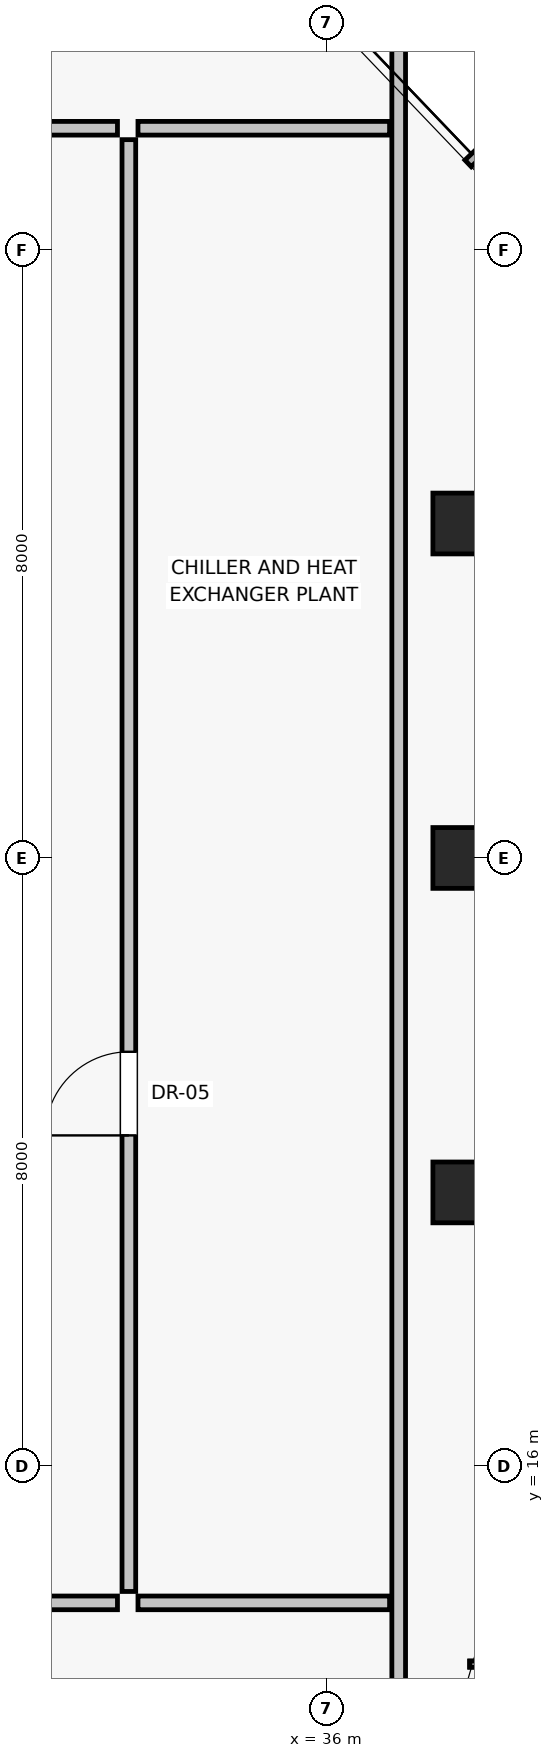
"""IFC4 building model, lengths in metres.
Left out: names, types, materials, properties, quantities, classifications, styles, units other than length and angle.
Written with IfcOpenShell. Run it as: python <this file> out.ifc"""

import sys

from ifc_helpers import new_model, si_unit, direction, frame, frame_2d, origin, origin_2d, place, context, subcontext, project, spatial, rectangle, extrude, source, transform, mapped, element, fill, save


model = new_model("IFC4")
c1 = context("Model", 3, precision=1e-05, world=origin(), true_north=direction((0.0, 1.0)))
c2 = subcontext(c1, "Body", "Model", "MODEL_VIEW")
j1 = project(units=[si_unit("LENGTHUNIT", "METRE"), si_unit("PLANEANGLEUNIT", "RADIAN")], contexts=[c1])
p1 = place(None, origin())
s1 = spatial("IfcSite", under=j1, at=p1, CompositionType="ELEMENT")
p2 = place(p1, origin())
s2 = spatial("IfcBuilding", under=s1, at=p2, CompositionType="ELEMENT")
p3 = place(p2, frame((0.0, 0.0, 264.25)))
s3 = spatial("IfcBuildingStorey", under=s2, at=p3, CompositionType="ELEMENT", Elevation=264.25)
for number, where, z_axis, x_axis in (
    (1, (37.8, 19.6, 0.0), (0.0, 0.0, 1.0), (1.0, 0.0, 0.0)),
    (2, (37.8, 24.0, 0.0), (0.0, 0.0, 1.0), (1.0, 0.0, 0.0)),
    (3, (37.8, 28.4, 0.0), (0.0, 0.0, 1.0), (1.0, 0.0, 0.0)),
):
    element("IfcColumn", number, at=place(p3, frame(where, z_axis=z_axis, x_axis=x_axis)), inside=s3, PredefinedType="COLUMN", context=c2, shape_type="SweptSolid", body=[
        extrude(rectangle(XDim=0.8, YDim=0.8, at=origin_2d()), origin(), (0.0, 0.0, 1.0), 4.65),
    ])
p4 = place(p3, frame((14.75, 14.2, 0.0), z_axis=(0.0, 0.0, 1.0), x_axis=(1.0, 0.0, 0.0)))
e4 = element("IfcWall", 4, at=p4, inside=s3, PredefinedType="PARTITIONING", context=c2, shape_type="SweptSolid", body=[
    extrude(rectangle(XDim=18.5, YDim=0.18, at=frame_2d((9.25, 0.0))), origin(), (0.0, 0.0, 1.0), 4.39),
])
p5 = place(p4, frame((6.0, 0.0, 0.0)))
e5 = element("IfcOpeningElement", 5, at=p5, cuts=e4, PredefinedType="OPENING", context=c2, shape_type="SweptSolid", body=[
    extrude(rectangle(XDim=1.1, YDim=2.03, at=frame_2d((0.55, 1.015))), frame((0.0, 0.1, 0.0), z_axis=(0.0, -1.0, 0.0), x_axis=(1.0, 0.0, 0.0)), (0.0, 0.0, 1.0), 0.2),
])
p6 = place(p3, frame((33.4, 14.35, 0.0), z_axis=(0.0, 0.0, 1.0), x_axis=(0.0, 1.0, 0.0)))
e6 = element("IfcWall", 6, at=p6, inside=s3, PredefinedType="PARTITIONING", context=c2, shape_type="SweptSolid", body=[
    extrude(rectangle(XDim=19.1, YDim=0.18, at=frame_2d((9.55, 0.0))), origin(), (0.0, 0.0, 1.0), 4.39),
])
p7 = place(p6, frame((6.0, 0.0, 0.0)))
e7 = element("IfcOpeningElement", 7, at=p7, cuts=e6, PredefinedType="OPENING", context=c2, shape_type="SweptSolid", body=[
    extrude(rectangle(XDim=1.1, YDim=2.03, at=frame_2d((0.55, 1.015))), frame((0.0, 0.1, 0.0), z_axis=(0.0, -1.0, 0.0), x_axis=(1.0, 0.0, 0.0)), (0.0, 0.0, 1.0), 0.2),
])
p8 = place(p3, frame((14.75, 33.6, 0.0), z_axis=(0.0, 0.0, 1.0), x_axis=(1.0, 0.0, 0.0)))
e8 = element("IfcWall", 8, at=p8, inside=s3, PredefinedType="PARTITIONING", context=c2, shape_type="SweptSolid", body=[
    extrude(rectangle(XDim=18.5, YDim=0.18, at=frame_2d((9.25, 0.0))), origin(), (0.0, 0.0, 1.0), 4.39),
])
p9 = place(p8, frame((6.0, 0.0, 0.0)))
e9 = element("IfcOpeningElement", 9, at=p9, cuts=e8, PredefinedType="OPENING", context=c2, shape_type="SweptSolid", body=[
    extrude(rectangle(XDim=1.1, YDim=2.03, at=frame_2d((0.55, 1.015))), frame((0.0, 0.1, 0.0), z_axis=(0.0, -1.0, 0.0), x_axis=(1.0, 0.0, 0.0)), (0.0, 0.0, 1.0), 0.2),
])
p10 = place(p3, frame((36.95, 11.17, 0.0), z_axis=(0.0, 0.0, 1.0), x_axis=(0.0, 1.0, 0.0)))
e10 = element("IfcWall", 10, at=p10, inside=s3, PredefinedType="PARTITIONING", context=c2, shape_type="SweptSolid", body=[
    extrude(rectangle(XDim=25.66, YDim=0.18, at=frame_2d((12.83, 0.0))), origin(), (0.0, 0.0, 1.0), 2.19),
])
for number, where, z_axis, x_axis in (
    (11, (33.52, 14.2, 0.0), (0.0, 0.0, 1.0), (1.0, 0.0, 0.0)),
    (12, (33.52, 33.6, 0.0), (0.0, 0.0, 1.0), (1.0, 0.0, 0.0)),
):
    element("IfcWall", number, at=place(p3, frame(where, z_axis=z_axis, x_axis=x_axis)), inside=s3, PredefinedType="PARTITIONING", context=c2, shape_type="SweptSolid", body=[
        extrude(rectangle(XDim=3.31, YDim=0.18, at=frame_2d((1.655, 0.0))), origin(), (0.0, 0.0, 1.0), 4.39),
    ])
m1 = source(origin(), c2, "Body", "SweptSolid", [
    extrude(rectangle(XDim=1.1, YDim=2.03, at=frame_2d((0.55, 1.015))), frame((0.0, 0.025, 0.0), z_axis=(0.0, -1.0, 0.0), x_axis=(1.0, 0.0, 0.0)), (0.0, 0.0, 1.0), 0.05),
])
p11 = place(p7, origin())
e13 = element("IfcDoor", 13, at=p11, inside=s3, OperationType="SINGLE_SWING_LEFT", PredefinedType="DOOR", context=c2, shape_type="MappedRepresentation", body=[
    mapped(m1, transform((0.0, 0.0, 0.0), scale=1.0)),
])
fill(e7, e13)
save(model, sys.argv[1])
